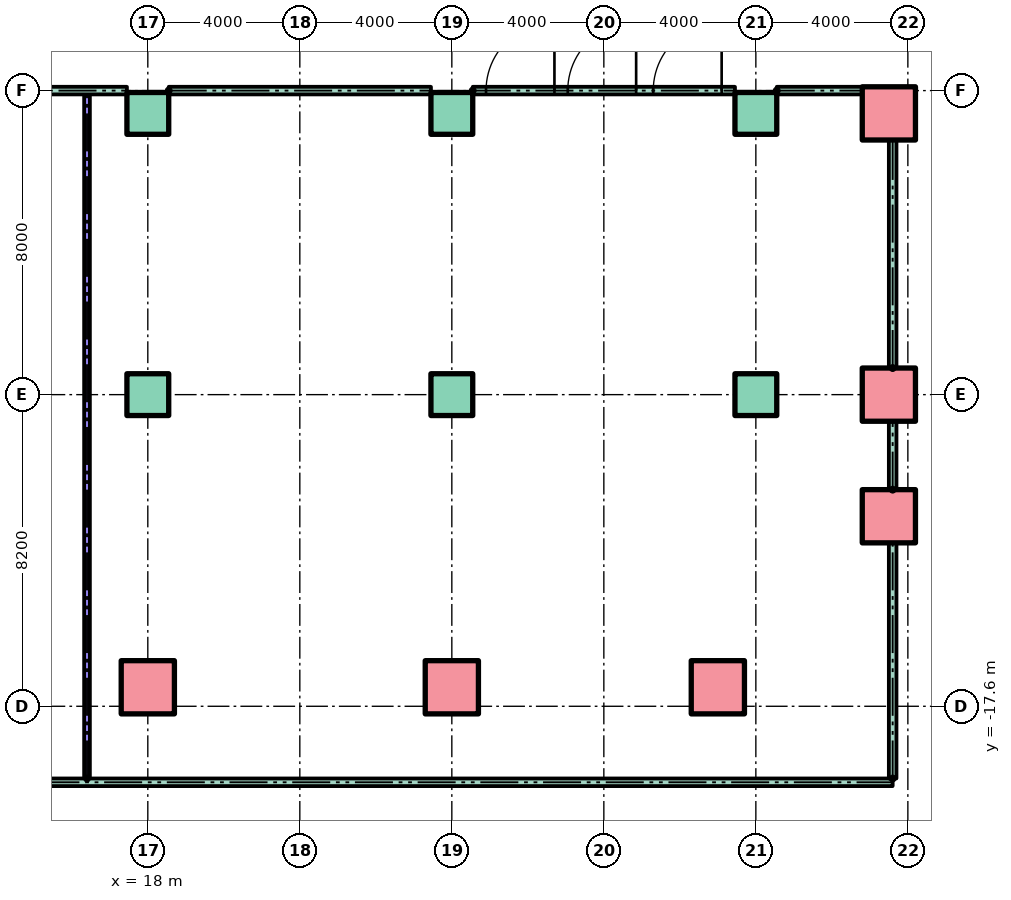
"""IFC4 building model, lengths in metres.
Left out: names, types, materials, properties, quantities, classifications, styles, units other than length and angle.
Written with IfcOpenShell. Run it as: python <this file> out.ifc"""

import sys

from ifc_helpers import new_model, si_unit, direction, frame, frame_2d, origin, origin_2d, place, context, subcontext, project, spatial, rectangle, hollow_rectangle, extrude, element, fill, save


model = new_model("IFC4")
c1 = context("Model", 3, precision=1e-05, world=origin(), true_north=direction((0.0, 1.0)))
c2 = subcontext(c1, "Body", "Model", "MODEL_VIEW")
j1 = project(units=[si_unit("LENGTHUNIT", "METRE"), si_unit("PLANEANGLEUNIT", "RADIAN")], contexts=[c1])
p1 = place(None, origin())
s1 = spatial("IfcSite", under=j1, at=p1, CompositionType="ELEMENT")
p2 = place(p1, origin())
s2 = spatial("IfcBuilding", under=s1, at=p2, CompositionType="ELEMENT")
p3 = place(p2, origin())
s3 = spatial("IfcBuildingStorey", under=s2, at=p3, CompositionType="ELEMENT", Elevation=0.0)
for number, where in (
    (1, (18.0, -17.1, 0.0)),
    (2, (26.0, -17.1, 0.0)),
    (3, (33.0, -17.1, 0.0)),
    (4, (37.5, -12.6, 0.0)),
):
    element("IfcColumn", number, at=place(p3, frame(where)), inside=s3, PredefinedType="COLUMN", context=c2, shape_type="SweptSolid", body=[
        extrude(hollow_rectangle(XDim=1.4, YDim=1.4, WallThickness=0.08, at=origin_2d()), origin(), (0.0, 0.0, 1.0), 6.0),
    ])
for number, where in (
    (5, (18.0, -9.4, 0.0)),
    (6, (26.0, -9.4, 0.0)),
    (7, (34.0, -9.4, 0.0)),
):
    element("IfcColumn", number, at=place(p3, frame(where)), inside=s3, PredefinedType="COLUMN", context=c2, shape_type="SweptSolid", body=[
        extrude(rectangle(XDim=1.1, YDim=1.1, at=origin_2d()), origin(), (0.0, 0.0, 1.0), 6.0),
    ])
p4 = place(p3, frame((37.5, -9.4, 0.0)))
e8 = element("IfcColumn", 8, at=p4, inside=s3, PredefinedType="COLUMN", context=c2, shape_type="SweptSolid", body=[
    extrude(hollow_rectangle(XDim=1.4, YDim=1.4, WallThickness=0.08, at=origin_2d()), origin(), (0.0, 0.0, 1.0), 6.0),
])
for number, where in (
    (9, (18.0, -2.0, 0.0)),
    (10, (26.0, -2.0, 0.0)),
    (11, (34.0, -2.0, 0.0)),
):
    element("IfcColumn", number, at=place(p3, frame(where)), inside=s3, PredefinedType="COLUMN", context=c2, shape_type="SweptSolid", body=[
        extrude(rectangle(XDim=1.1, YDim=1.1, at=origin_2d()), origin(), (0.0, 0.0, 1.0), 6.0),
    ])
p5 = place(p3, frame((37.5, -2.0, 0.0)))
e12 = element("IfcColumn", 12, at=p5, inside=s3, PredefinedType="COLUMN", context=c2, shape_type="SweptSolid", body=[
    extrude(hollow_rectangle(XDim=1.4, YDim=1.4, WallThickness=0.08, at=origin_2d()), origin(), (0.0, 0.0, 1.0), 6.0),
])
p6 = place(p3, frame((-37.6, -19.6, 0.0)))
e13 = element("IfcWall", 13, at=p6, inside=s3, PredefinedType="PARTITIONING", context=c2, shape_type="SweptSolid", body=[
    extrude(rectangle(XDim=75.2, YDim=0.2, at=frame_2d((37.6, 0.0))), origin(), (0.0, 0.0, 1.0), 5.7),
])
p7 = place(p6, frame((26.204, 0.0, 0.0)))
e14 = element("IfcOpeningElement", 14, at=p7, cuts=e13, PredefinedType="OPENING", context=c2, shape_type="SweptSolid", body=[
    extrude(rectangle(XDim=1.8, YDim=2.1, at=frame_2d((0.9, 1.05))), frame((0.0, 0.11, 0.0), z_axis=(0.0, -1.0, 0.0), x_axis=(1.0, 0.0, 0.0)), (0.0, 0.0, 1.0), 0.22),
])
p8 = place(p6, frame((36.7, 0.0, 0.0)))
e15 = element("IfcOpeningElement", 15, at=p8, cuts=e13, PredefinedType="OPENING", context=c2, shape_type="SweptSolid", body=[
    extrude(rectangle(XDim=1.8, YDim=2.1, at=frame_2d((0.9, 1.05))), frame((0.0, 0.11, 0.0), z_axis=(0.0, -1.0, 0.0), x_axis=(1.0, 0.0, 0.0)), (0.0, 0.0, 1.0), 0.22),
])
p9 = place(p6, frame((47.196, 0.0, 0.0)))
e16 = element("IfcOpeningElement", 16, at=p9, cuts=e13, PredefinedType="OPENING", context=c2, shape_type="SweptSolid", body=[
    extrude(rectangle(XDim=1.8, YDim=2.1, at=frame_2d((0.9, 1.05))), frame((0.0, 0.11, 0.0), z_axis=(0.0, -1.0, 0.0), x_axis=(1.0, 0.0, 0.0)), (0.0, 0.0, 1.0), 0.22),
])
p10 = place(p3, frame((14.0, -1.4, 0.0)))
e17 = element("IfcWall", 17, at=p10, inside=s3, PredefinedType="PARTITIONING", context=c2, shape_type="SweptSolid", body=[
    extrude(rectangle(XDim=3.45, YDim=0.2, at=frame_2d((1.725, 0.0))), origin(), (0.0, 0.0, 1.0), 5.7),
])
p11 = place(p3, frame((18.55, -1.4, 0.0)))
e18 = element("IfcWall", 18, at=p11, inside=s3, PredefinedType="PARTITIONING", context=c2, shape_type="SweptSolid", body=[
    extrude(rectangle(XDim=6.9, YDim=0.2, at=frame_2d((3.45, 0.0))), origin(), (0.0, 0.0, 1.0), 5.7),
])
p12 = place(p3, frame((26.55, -1.4, 0.0)))
e19 = element("IfcWall", 19, at=p12, inside=s3, PredefinedType="PARTITIONING", context=c2, shape_type="SweptSolid", body=[
    extrude(rectangle(XDim=6.9, YDim=0.2, at=frame_2d((3.45, 0.0))), origin(), (0.0, 0.0, 1.0), 5.7),
])
p13 = place(p12, frame((0.35, 0.0, 0.0)))
e20 = element("IfcOpeningElement", 20, at=p13, cuts=e19, PredefinedType="OPENING", context=c2, shape_type="SweptSolid", body=[
    extrude(rectangle(XDim=1.8, YDim=2.1, at=frame_2d((0.9, 1.05))), frame((0.0, 0.11, 0.0), z_axis=(0.0, -1.0, 0.0), x_axis=(1.0, 0.0, 0.0)), (0.0, 0.0, 1.0), 0.22),
])
p14 = place(p12, frame((2.5, 0.0, 0.0)))
e21 = element("IfcOpeningElement", 21, at=p14, cuts=e19, PredefinedType="OPENING", context=c2, shape_type="SweptSolid", body=[
    extrude(rectangle(XDim=1.8, YDim=2.1, at=frame_2d((0.9, 1.05))), frame((0.0, 0.11, 0.0), z_axis=(0.0, -1.0, 0.0), x_axis=(1.0, 0.0, 0.0)), (0.0, 0.0, 1.0), 0.22),
])
p15 = place(p12, frame((4.75, 0.0, 0.0)))
e22 = element("IfcOpeningElement", 22, at=p15, cuts=e19, PredefinedType="OPENING", context=c2, shape_type="SweptSolid", body=[
    extrude(rectangle(XDim=1.8, YDim=2.1, at=frame_2d((0.9, 1.05))), frame((0.0, 0.11, 0.0), z_axis=(0.0, -1.0, 0.0), x_axis=(1.0, 0.0, 0.0)), (0.0, 0.0, 1.0), 0.22),
])
p16 = place(p3, frame((34.55, -1.4, 0.0)))
e23 = element("IfcWall", 23, at=p16, inside=s3, PredefinedType="PARTITIONING", context=c2, shape_type="SweptSolid", body=[
    extrude(rectangle(XDim=2.25, YDim=0.2, at=frame_2d((1.125, 0.0))), origin(), (0.0, 0.0, 1.0), 5.7),
])
p17 = place(p3, frame((16.4, -19.5, 0.0), z_axis=(0.0, 0.0, 1.0), x_axis=(0.0, 1.0, 0.0)))
e24 = element("IfcWall", 24, at=p17, inside=s3, PredefinedType="PARTITIONING", context=c2, shape_type="SweptSolid", body=[
    extrude(rectangle(XDim=18.0, YDim=0.15, at=frame_2d((9.0, 0.0))), origin(), (0.0, 0.0, 1.0), 5.7),
])
p18 = place(p3, frame((37.6, -19.5, 0.0), z_axis=(0.0, 0.0, 1.0), x_axis=(0.0, 1.0, 0.0)))
e25 = element("IfcWall", 25, at=p18, inside=s3, PredefinedType="PARTITIONING", context=c2, shape_type="SweptSolid", body=[
    extrude(rectangle(XDim=6.2, YDim=0.2, at=frame_2d((3.1, 0.0))), origin(), (0.0, 0.0, 1.0), 5.7),
])
p19 = place(p3, frame((37.6, -11.9, 0.0), z_axis=(0.0, 0.0, 1.0), x_axis=(0.0, 1.0, 0.0)))
e26 = element("IfcWall", 26, at=p19, inside=s3, PredefinedType="PARTITIONING", context=c2, shape_type="SweptSolid", body=[
    extrude(rectangle(XDim=1.8, YDim=0.2, at=frame_2d((0.9, 0.0))), origin(), (0.0, 0.0, 1.0), 5.7),
])
p20 = place(p3, frame((37.6, -8.7, 0.0), z_axis=(0.0, 0.0, 1.0), x_axis=(0.0, 1.0, 0.0)))
e27 = element("IfcWall", 27, at=p20, inside=s3, PredefinedType="PARTITIONING", context=c2, shape_type="SweptSolid", body=[
    extrude(rectangle(XDim=6.0, YDim=0.2, at=frame_2d((3.0, 0.0))), origin(), (0.0, 0.0, 1.0), 5.7),
])
p21 = place(p13, origin())
e28 = element("IfcDoor", 28, at=p21, inside=s3, OperationType="DOUBLE_DOOR_SINGLE_SWING", PredefinedType="DOOR", context=c2, shape_type="SweptSolid", body=[
    extrude(rectangle(XDim=1.8, YDim=2.1, at=frame_2d((0.9, 1.05))), frame((0.0, 0.025, 0.0), z_axis=(0.0, -1.0, 0.0), x_axis=(1.0, 0.0, 0.0)), (0.0, 0.0, 1.0), 0.05),
])
fill(e20, e28)
p22 = place(p14, origin())
e29 = element("IfcDoor", 29, at=p22, inside=s3, OperationType="DOUBLE_DOOR_SINGLE_SWING", PredefinedType="DOOR", context=c2, shape_type="SweptSolid", body=[
    extrude(rectangle(XDim=1.8, YDim=2.1, at=frame_2d((0.9, 1.05))), frame((0.0, 0.025, 0.0), z_axis=(0.0, -1.0, 0.0), x_axis=(1.0, 0.0, 0.0)), (0.0, 0.0, 1.0), 0.05),
])
fill(e21, e29)
p23 = place(p15, origin())
e30 = element("IfcDoor", 30, at=p23, inside=s3, OperationType="DOUBLE_DOOR_SINGLE_SWING", PredefinedType="DOOR", context=c2, shape_type="SweptSolid", body=[
    extrude(rectangle(XDim=1.8, YDim=2.1, at=frame_2d((0.9, 1.05))), frame((0.0, 0.025, 0.0), z_axis=(0.0, -1.0, 0.0), x_axis=(1.0, 0.0, 0.0)), (0.0, 0.0, 1.0), 0.05),
])
fill(e22, e30)
save(model, sys.argv[1])
